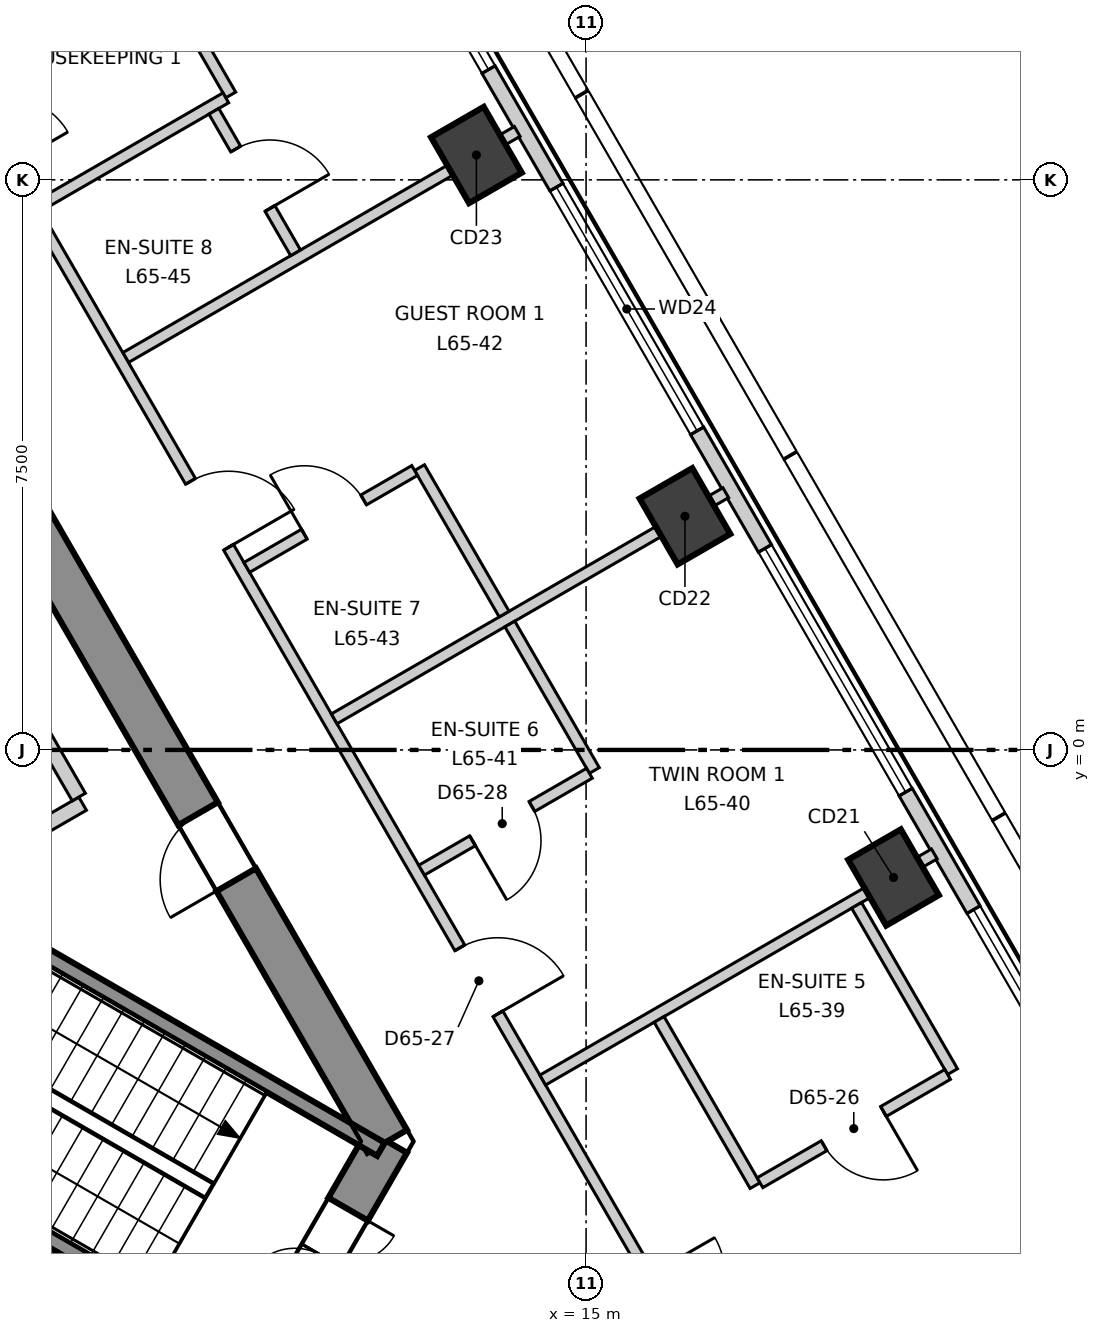
"""IFC4 building model, lengths in metres.
Left out: names, types, materials, properties, quantities, classifications, styles, units other than length and angle.
Written with IfcOpenShell. Run it as: python <this file> out.ifc"""

import sys

from ifc_helpers import new_model, si_unit, direction, frame, frame_2d, origin, origin_2d, place, context, subcontext, project, spatial, polyline, rectangle, outline, extrude, element, fill, save


model = new_model("IFC4")
c1 = context("Model", 3, precision=1e-05, world=origin(), true_north=direction((0.0, 1.0)))
c2 = subcontext(c1, "Body", "Model", "MODEL_VIEW")
j1 = project(units=[si_unit("LENGTHUNIT", "METRE"), si_unit("PLANEANGLEUNIT", "RADIAN")], contexts=[c1])
p1 = place(None, origin())
s1 = spatial("IfcSite", under=j1, at=p1, CompositionType="ELEMENT")
p2 = place(p1, origin())
s2 = spatial("IfcBuilding", under=s1, at=p2, CompositionType="ELEMENT")
p3 = place(p2, frame((0.0, 0.0, 279.1)))
s3 = spatial("IfcBuildingStorey", under=s2, at=p3, CompositionType="ELEMENT", Elevation=279.1)
p4 = place(p3, frame((10.652, -8.15, -0.3), z_axis=(0.0, 0.0, 1.0), x_axis=(0.49997462182, 0.866040055388, 0.0)))
e1 = element("IfcWall", 1, at=p4, inside=s3, PredefinedType="SHEAR", context=c2, shape_type="SweptSolid", body=[
    extrude(outline(polyline([(-0.173, -0.3), (1.732, -0.301), (3.638, -0.301), (3.291, 0.3), (1.732, 0.3), (0.173, 0.3), (-0.173, -0.3)])), origin(), (0.0, 0.0, 1.0), 3.6),
])
p5 = place(p4, frame((1.032, 0.0, 0.3)))
e2 = element("IfcOpeningElement", 2, at=p5, cuts=e1, PredefinedType="OPENING", context=c2, shape_type="SweptSolid", body=[
    extrude(rectangle(XDim=1.4, YDim=2.1, at=frame_2d((0.7, 1.05))), frame((0.0, 0.31, 0.0), z_axis=(0.0, -1.0, 0.0), x_axis=(1.0, 0.0, 0.0)), (0.0, 0.0, 1.0), 0.621),
])
p6 = place(p3, frame((12.384, -5.15, -0.3), z_axis=(0.0, 0.0, 1.0), x_axis=(-0.500000539815, 0.866025092122, 0.0)))
e3 = element("IfcWall", 3, at=p6, inside=s3, PredefinedType="SHEAR", context=c2, shape_type="SweptSolid", body=[
    extrude(outline(polyline([(-0.173, -0.301), (1.795, -0.301), (3.763, -0.301), (5.731, -0.301), (7.7, -0.301), (9.668, -0.301), (11.636, -0.301), (13.604, -0.3), (15.573, -0.3), (17.541, -0.3), (19.509, -0.3), (21.477, -0.3), (21.131, 0.3), (19.226, 0.3), (17.321, 0.3), (15.415, 0.3), (13.51, 0.3), (11.605, 0.3), (9.699, 0.3), (7.794, 0.3), (5.889, 0.3), (3.984, 0.3), (2.078, 0.3), (0.173, 0.3), (-0.173, -0.301)])), origin(), (0.0, 0.0, 1.0), 3.6),
])
p7 = place(p6, frame((16.378, 0.0, 0.3)))
e4 = element("IfcOpeningElement", 4, at=p7, cuts=e3, PredefinedType="OPENING", context=c2, shape_type="SweptSolid", body=[
    extrude(rectangle(XDim=0.9, YDim=2.1, at=frame_2d((0.45, 1.05))), frame((0.0, 0.31, 0.0), z_axis=(0.0, -1.0, 0.0), x_axis=(1.0, 0.0, 0.0)), (0.0, 0.0, 1.0), 0.621),
])
p8 = place(p6, frame((3.976, 0.0, 0.3)))
e5 = element("IfcOpeningElement", 5, at=p8, cuts=e3, PredefinedType="OPENING", context=c2, shape_type="SweptSolid", body=[
    extrude(rectangle(XDim=1.0, YDim=2.1, at=frame_2d((0.5, 1.05))), frame((0.0, 0.31, 0.0), z_axis=(0.0, -1.0, 0.0), x_axis=(1.0, 0.0, 0.0)), (0.0, 0.0, 1.0), 0.621),
])
for number, where, z_axis, x_axis in (
    (6, (19.045, -1.678, -0.3), (0.0, 0.0, 1.0), (-0.5, 0.866, 0.0)),
    (7, (16.301, 3.074, -0.3), (0.0, 0.0, 1.0), (-0.5, 0.866, 0.0)),
    (8, (13.557, 7.827, -0.3), (0.0, 0.0, 1.0), (-0.5, 0.866, 0.0)),
):
    element("IfcColumn", number, at=place(p3, frame(where, z_axis=z_axis, x_axis=x_axis)), inside=s3, PredefinedType="COLUMN", context=c2, shape_type="SweptSolid", body=[
        extrude(rectangle(XDim=1.0, YDim=0.8, at=origin_2d()), origin(), (0.0, 0.0, 1.0), 3.6),
    ])
p9 = place(p3, frame((25.791, -11.962, 0.0), z_axis=(0.0, 0.0, 1.0), x_axis=(-0.500006870765, 0.86602143691, 0.0)))
e9 = element("IfcWall", 9, at=p9, inside=s3, PredefinedType="ELEMENTEDWALL", context=c2, shape_type="SweptSolid", body=[
    extrude(rectangle(XDim=46.49, YDim=0.2, at=frame_2d((23.245, 0.0))), origin(), (0.0, 0.0, 1.0), 3.3),
])
p10 = place(p9, frame((2.197, 0.0, 0.9)))
e10 = element("IfcOpeningElement", 10, at=p10, cuts=e9, PredefinedType="OPENING", context=c2, shape_type="SweptSolid", body=[
    extrude(rectangle(XDim=3.7, YDim=2.2, at=frame_2d((1.85, 1.1))), frame((0.0, 0.11, 0.0), z_axis=(0.0, -1.0, 0.0), x_axis=(1.0, 0.0, 0.0)), (0.0, 0.0, 1.0), 0.22),
])
p11 = place(p9, frame((7.685, 0.0, 0.9)))
e11 = element("IfcOpeningElement", 11, at=p11, cuts=e9, PredefinedType="OPENING", context=c2, shape_type="SweptSolid", body=[
    extrude(rectangle(XDim=3.7, YDim=2.2, at=frame_2d((1.85, 1.1))), frame((0.0, 0.11, 0.0), z_axis=(0.0, -1.0, 0.0), x_axis=(1.0, 0.0, 0.0)), (0.0, 0.0, 1.0), 0.22),
])
p12 = place(p9, frame((13.173, 0.0, 0.9)))
e12 = element("IfcOpeningElement", 12, at=p12, cuts=e9, PredefinedType="OPENING", context=c2, shape_type="SweptSolid", body=[
    extrude(rectangle(XDim=3.7, YDim=2.2, at=frame_2d((1.85, 1.1))), frame((0.0, 0.11, 0.0), z_axis=(0.0, -1.0, 0.0), x_axis=(1.0, 0.0, 0.0)), (0.0, 0.0, 1.0), 0.22),
])
p13 = place(p9, frame((18.661, 0.0, 0.9)))
e13 = element("IfcOpeningElement", 13, at=p13, cuts=e9, PredefinedType="OPENING", context=c2, shape_type="SweptSolid", body=[
    extrude(rectangle(XDim=3.7, YDim=2.2, at=frame_2d((1.85, 1.1))), frame((0.0, 0.11, 0.0), z_axis=(0.0, -1.0, 0.0), x_axis=(1.0, 0.0, 0.0)), (0.0, 0.0, 1.0), 0.22),
])
p14 = place(p9, frame((24.149, 0.0, 0.9)))
e14 = element("IfcOpeningElement", 14, at=p14, cuts=e9, PredefinedType="OPENING", context=c2, shape_type="SweptSolid", body=[
    extrude(rectangle(XDim=3.7, YDim=2.2, at=frame_2d((1.85, 1.1))), frame((0.0, 0.11, 0.0), z_axis=(0.0, -1.0, 0.0), x_axis=(1.0, 0.0, 0.0)), (0.0, 0.0, 1.0), 0.22),
])
p15 = place(p9, frame((29.637, 0.0, 0.9)))
e15 = element("IfcOpeningElement", 15, at=p15, cuts=e9, PredefinedType="OPENING", context=c2, shape_type="SweptSolid", body=[
    extrude(rectangle(XDim=3.7, YDim=2.2, at=frame_2d((1.85, 1.1))), frame((0.0, 0.11, 0.0), z_axis=(0.0, -1.0, 0.0), x_axis=(1.0, 0.0, 0.0)), (0.0, 0.0, 1.0), 0.22),
])
p16 = place(p9, frame((35.125, 0.0, 0.9)))
e16 = element("IfcOpeningElement", 16, at=p16, cuts=e9, PredefinedType="OPENING", context=c2, shape_type="SweptSolid", body=[
    extrude(rectangle(XDim=3.7, YDim=2.2, at=frame_2d((1.85, 1.1))), frame((0.0, 0.11, 0.0), z_axis=(0.0, -1.0, 0.0), x_axis=(1.0, 0.0, 0.0)), (0.0, 0.0, 1.0), 0.22),
])
p17 = place(p9, frame((40.613, 0.0, 0.9)))
e17 = element("IfcOpeningElement", 17, at=p17, cuts=e9, PredefinedType="OPENING", context=c2, shape_type="SweptSolid", body=[
    extrude(rectangle(XDim=3.7, YDim=2.2, at=frame_2d((1.85, 1.1))), frame((0.0, 0.11, 0.0), z_axis=(0.0, -1.0, 0.0), x_axis=(1.0, 0.0, 0.0)), (0.0, 0.0, 1.0), 0.22),
])
p18 = place(p3, frame((8.942, 5.162, 0.0), z_axis=(0.0, 0.0, 1.0), x_axis=(0.866004483474, 0.50003623329, 0.0)))
e18 = element("IfcWall", 18, at=p18, inside=s3, PredefinedType="PARTITIONING", context=c2, shape_type="SweptSolid", body=[
    extrude(rectangle(XDim=5.949, YDim=0.15, at=frame_2d((2.975, 0.0))), origin(), (0.0, 0.0, 1.0), 2.8),
])
p19 = place(p3, frame((0.075, 20.37, 0.0), z_axis=(0.0, 0.0, 1.0), x_axis=(0.500003985697, -0.866023102629, 0.0)))
e19 = element("IfcWall", 19, at=p19, inside=s3, PredefinedType="PARTITIONING", context=c2, shape_type="SweptSolid", body=[
    extrude(rectangle(XDim=35.206, YDim=0.15, at=frame_2d((17.603, 0.0))), origin(), (0.0, 0.0, 1.0), 3.3),
])
p20 = place(p19, frame((31.506, 0.0, 0.0)))
e20 = element("IfcOpeningElement", 20, at=p20, cuts=e19, PredefinedType="OPENING", context=c2, shape_type="SweptSolid", body=[
    extrude(rectangle(XDim=1.0, YDim=2.1, at=frame_2d((0.5, 1.05))), frame((0.0, 0.085, 0.0), z_axis=(0.0, -1.0, 0.0), x_axis=(1.0, 0.0, 0.0)), (0.0, 0.0, 1.0), 0.17),
])
p21 = place(p19, frame((26.529, 0.0, 0.0)))
e21 = element("IfcOpeningElement", 21, at=p21, cuts=e19, PredefinedType="OPENING", context=c2, shape_type="SweptSolid", body=[
    extrude(rectangle(XDim=1.0, YDim=2.1, at=frame_2d((0.5, 1.05))), frame((0.0, 0.085, 0.0), z_axis=(0.0, -1.0, 0.0), x_axis=(1.0, 0.0, 0.0)), (0.0, 0.0, 1.0), 0.17),
])
p22 = place(p19, frame((19.442, 0.0, 0.0)))
e22 = element("IfcOpeningElement", 22, at=p22, cuts=e19, PredefinedType="OPENING", context=c2, shape_type="SweptSolid", body=[
    extrude(rectangle(XDim=1.0, YDim=2.1, at=frame_2d((0.5, 1.05))), frame((0.0, 0.085, 0.0), z_axis=(0.0, -1.0, 0.0), x_axis=(1.0, 0.0, 0.0)), (0.0, 0.0, 1.0), 0.17),
])
p23 = place(p19, frame((8.254, 0.0, 0.0)))
e23 = element("IfcOpeningElement", 23, at=p23, cuts=e19, PredefinedType="OPENING", context=c2, shape_type="SweptSolid", body=[
    extrude(rectangle(XDim=1.0, YDim=2.1, at=frame_2d((0.5, 1.05))), frame((0.0, 0.085, 0.0), z_axis=(0.0, -1.0, 0.0), x_axis=(1.0, 0.0, 0.0)), (0.0, 0.0, 1.0), 0.17),
])
p24 = place(p19, frame((13.754, 0.0, 0.0)))
e24 = element("IfcOpeningElement", 24, at=p24, cuts=e19, PredefinedType="OPENING", context=c2, shape_type="SweptSolid", body=[
    extrude(rectangle(XDim=0.9, YDim=2.1, at=frame_2d((0.45, 1.05))), frame((0.0, 0.085, 0.0), z_axis=(0.0, -1.0, 0.0), x_axis=(1.0, 0.0, 0.0)), (0.0, 0.0, 1.0), 0.17),
])
p25 = place(p19, frame((11.554, 0.0, 0.0)))
e25 = element("IfcOpeningElement", 25, at=p25, cuts=e19, PredefinedType="OPENING", context=c2, shape_type="SweptSolid", body=[
    extrude(rectangle(XDim=0.9, YDim=2.1, at=frame_2d((0.45, 1.05))), frame((0.0, 0.085, 0.0), z_axis=(0.0, -1.0, 0.0), x_axis=(1.0, 0.0, 0.0)), (0.0, 0.0, 1.0), 0.17),
])
p26 = place(p19, frame((2.777, 0.0, 0.0)))
e26 = element("IfcOpeningElement", 26, at=p26, cuts=e19, PredefinedType="OPENING", context=c2, shape_type="SweptSolid", body=[
    extrude(rectangle(XDim=1.0, YDim=2.1, at=frame_2d((0.5, 1.05))), frame((0.0, 0.085, 0.0), z_axis=(0.0, -1.0, 0.0), x_axis=(1.0, 0.0, 0.0)), (0.0, 0.0, 1.0), 0.17),
])
p27 = place(p3, frame((8.125, 12.427, 0.0), z_axis=(0.0, 0.0, 1.0), x_axis=(0.500036278648, -0.866004457284, 0.0)))
e27 = element("IfcWall", 27, at=p27, inside=s3, PredefinedType="PARTITIONING", context=c2, shape_type="SweptSolid", body=[
    extrude(rectangle(XDim=4.4, YDim=0.15, at=frame_2d((2.2, 0.0))), origin(), (0.0, 0.0, 1.0), 3.3),
])
for number, where, z_axis, x_axis in (
    (28, (6.692, 9.06, 0.0), (0.0, 0.0, 1.0), (0.866, 0.5, 0.0)),
    (29, (7.792, 7.154, 0.0), (0.0, 0.0, 1.0), (0.866, 0.5, 0.0)),
):
    element("IfcWall", number, at=place(p3, frame(where, z_axis=z_axis, x_axis=x_axis)), inside=s3, PredefinedType="PARTITIONING", context=c2, shape_type="SweptSolid", body=[
        extrude(rectangle(XDim=2.85, YDim=0.15, at=frame_2d((1.425, 0.0))), origin(), (0.0, 0.0, 1.0), 3.3),
    ])
p28 = place(p3, frame((11.686, 0.409, 0.0), z_axis=(0.0, 0.0, 1.0), x_axis=(0.865976450533, 0.500084779935, 0.0)))
e30 = element("IfcWall", 30, at=p28, inside=s3, PredefinedType="PARTITIONING", context=c2, shape_type="SweptSolid", body=[
    extrude(rectangle(XDim=5.949, YDim=0.15, at=frame_2d((2.975, 0.0))), origin(), (0.0, 0.0, 1.0), 3.3),
])
p29 = place(p3, frame((14.43, -4.343, 0.0), z_axis=(0.0, 0.0, 1.0), x_axis=(0.865986712877, 0.50006700863, 0.0)))
e31 = element("IfcWall", 31, at=p29, inside=s3, PredefinedType="PARTITIONING", context=c2, shape_type="SweptSolid", body=[
    extrude(rectangle(XDim=5.949, YDim=0.15, at=frame_2d((2.975, 0.0))), origin(), (0.0, 0.0, 1.0), 3.3),
])
p30 = place(p3, frame((15.961, -3.545, 0.0), z_axis=(0.0, 0.0, 1.0), x_axis=(0.499789415832, -0.866146950478, 0.0)))
e32 = element("IfcWall", 32, at=p30, inside=s3, PredefinedType="PARTITIONING", context=c2, shape_type="SweptSolid", body=[
    extrude(rectangle(XDim=2.525, YDim=0.15, at=frame_2d((1.262, 0.0))), origin(), (0.0, 0.0, 1.0), 3.3),
])
p31 = place(p3, frame((18.559, -2.045, 0.0), z_axis=(0.0, 0.0, 1.0), x_axis=(0.500079482444, -0.865979509711, 0.0)))
e33 = element("IfcWall", 33, at=p31, inside=s3, PredefinedType="PARTITIONING", context=c2, shape_type="SweptSolid", body=[
    extrude(rectangle(XDim=2.525, YDim=0.15, at=frame_2d((1.263, 0.0))), origin(), (0.0, 0.0, 1.0), 3.3),
])
p32 = place(p3, frame((10.103, 8.402, 0.0), z_axis=(0.0, 0.0, 1.0), x_axis=(0.499961633463, -0.866047553582, 0.0)))
e34 = element("IfcWall", 34, at=p32, inside=s3, PredefinedType="PARTITIONING", context=c2, shape_type="SweptSolid", body=[
    extrude(rectangle(XDim=2.15, YDim=0.15, at=frame_2d((1.075, 0.0))), origin(), (0.0, 0.0, 1.0), 3.3),
])
p33 = place(p32, frame((0.575, 0.0, 0.0)))
e35 = element("IfcOpeningElement", 35, at=p33, cuts=e34, PredefinedType="OPENING", context=c2, shape_type="SweptSolid", body=[
    extrude(rectangle(XDim=0.9, YDim=2.1, at=frame_2d((0.45, 1.05))), frame((0.0, 0.085, 0.0), z_axis=(0.0, -1.0, 0.0), x_axis=(1.0, 0.0, 0.0)), (0.0, 0.0, 1.0), 0.17),
])
p34 = place(p3, frame((12.809, 3.714, 0.0), z_axis=(0.0, 0.0, 1.0), x_axis=(0.500162441854, -0.865931597621, 0.0)))
e36 = element("IfcWall", 36, at=p34, inside=s3, PredefinedType="PARTITIONING", context=c2, shape_type="SweptSolid", body=[
    extrude(rectangle(XDim=2.225, YDim=0.15, at=frame_2d((1.113, 0.0))), origin(), (0.0, 0.0, 1.0), 3.3),
])
p35 = place(p3, frame((13.997, 1.657, 0.0), z_axis=(0.0, 0.0, 1.0), x_axis=(0.499750953666, -0.866169143014, 0.0)))
e37 = element("IfcWall", 37, at=p35, inside=s3, PredefinedType="PARTITIONING", context=c2, shape_type="SweptSolid", body=[
    extrude(rectangle(XDim=2.225, YDim=0.15, at=frame_2d((1.112, 0.0))), origin(), (0.0, 0.0, 1.0), 3.3),
])
p36 = place(p3, frame((12.836, -1.582, 0.0), z_axis=(0.0, 0.0, 1.0), x_axis=(0.865965520905, 0.500103705848, 0.0)))
e38 = element("IfcWall", 38, at=p36, inside=s3, PredefinedType="PARTITIONING", context=c2, shape_type="SweptSolid", body=[
    extrude(rectangle(XDim=2.55, YDim=0.15, at=frame_2d((1.275, 0.0))), origin(), (0.0, 0.0, 1.0), 3.3),
])
p37 = place(p36, frame((0.775, 0.0, 0.0)))
e39 = element("IfcOpeningElement", 39, at=p37, cuts=e38, PredefinedType="OPENING", context=c2, shape_type="SweptSolid", body=[
    extrude(rectangle(XDim=0.9, YDim=2.1, at=frame_2d((0.45, 1.05))), frame((0.0, 0.085, 0.0), z_axis=(0.0, -1.0, 0.0), x_axis=(1.0, 0.0, 0.0)), (0.0, 0.0, 1.0), 0.17),
])
p38 = place(p3, frame((10.536, 2.401, 0.0), z_axis=(0.0, 0.0, 1.0), x_axis=(0.865965520905, 0.500103705848, 0.0)))
e40 = element("IfcWall", 40, at=p38, inside=s3, PredefinedType="PARTITIONING", context=c2, shape_type="SweptSolid", body=[
    extrude(rectangle(XDim=2.55, YDim=0.15, at=frame_2d((1.275, 0.0))), origin(), (0.0, 0.0, 1.0), 3.3),
])
p39 = place(p38, frame((0.875, 0.0, 0.0)))
e41 = element("IfcOpeningElement", 41, at=p39, cuts=e40, PredefinedType="OPENING", context=c2, shape_type="SweptSolid", body=[
    extrude(rectangle(XDim=0.9, YDim=2.1, at=frame_2d((0.45, 1.05))), frame((0.0, 0.085, 0.0), z_axis=(0.0, -1.0, 0.0), x_axis=(1.0, 0.0, 0.0)), (0.0, 0.0, 1.0), 0.17),
])
p40 = place(p3, frame((17.288, -5.694, 0.0), z_axis=(0.0, 0.0, 1.0), x_axis=(0.866090043625, 0.499888023795, 0.0)))
e42 = element("IfcWall", 42, at=p40, inside=s3, PredefinedType="PARTITIONING", context=c2, shape_type="SweptSolid", body=[
    extrude(rectangle(XDim=2.851, YDim=0.15, at=frame_2d((1.425, 0.0))), origin(), (0.0, 0.0, 1.0), 3.3),
])
p41 = place(p40, frame((0.975, 0.0, 0.0)))
e43 = element("IfcOpeningElement", 43, at=p41, cuts=e42, PredefinedType="OPENING", context=c2, shape_type="SweptSolid", body=[
    extrude(rectangle(XDim=0.9, YDim=2.1, at=frame_2d((0.45, 1.05))), frame((0.0, 0.085, 0.0), z_axis=(0.0, -1.0, 0.0), x_axis=(1.0, 0.0, 0.0)), (0.0, 0.0, 1.0), 0.17),
])
p42 = place(p3, frame((6.642, -1.708, 0.0), z_axis=(0.0, 0.0, 1.0), x_axis=(0.866043441391, 0.499968756647, 0.0)))
e44 = element("IfcWall", 44, at=p42, inside=s3, PredefinedType="SOLIDWALL", context=c2, shape_type="SweptSolid", body=[
    extrude(rectangle(XDim=2.002, YDim=0.2, at=frame_2d((1.001, 0.0))), origin(), (0.0, 0.0, 1.0), 3.3),
])
p43 = place(p3, frame((6.826, 1.978, 0.0), z_axis=(0.0, 0.0, 1.0), x_axis=(0.499990139034, -0.866031096941, 0.0)))
e45 = element("IfcWall", 45, at=p43, inside=s3, PredefinedType="SOLIDWALL", context=c2, shape_type="SweptSolid", body=[
    extrude(rectangle(XDim=3.0, YDim=0.2, at=frame_2d((1.5, 0.0))), origin(), (0.0, 0.0, 1.0), 3.3),
])
p44 = place(p3, frame((6.529, -1.922, 0.0), z_axis=(0.0, 0.0, 1.0), x_axis=(0.866068467981, -0.499925403204, 0.0)))
e46 = element("IfcWall", 46, at=p44, inside=s3, PredefinedType="SOLIDWALL", context=c2, shape_type="SweptSolid", body=[
    extrude(rectangle(XDim=6.665, YDim=0.2, at=frame_2d((3.332, 0.0))), origin(), (0.0, 0.0, 1.0), 3.3),
])
p45 = place(p3, frame((4.929, -4.693, 0.0), z_axis=(0.0, 0.0, 1.0), x_axis=(0.866005022404, -0.500035299925, 0.0)))
e47 = element("IfcWall", 47, at=p45, inside=s3, PredefinedType="SOLIDWALL", context=c2, shape_type="SweptSolid", body=[
    extrude(rectangle(XDim=6.665, YDim=0.2, at=frame_2d((3.333, 0.0))), origin(), (0.0, 0.0, 1.0), 3.3),
])
p46 = place(p11, origin())
e48 = element("IfcWindow", 48, at=p46, inside=s3, PartitioningType="SINGLE_PANEL", PredefinedType="WINDOW", context=c2, shape_type="SweptSolid", body=[
    extrude(rectangle(XDim=3.7, YDim=2.2, at=frame_2d((1.85, 1.1))), frame((0.0, 0.03, 0.0), z_axis=(0.0, -1.0, 0.0), x_axis=(1.0, 0.0, 0.0)), (0.0, 0.0, 1.0), 0.06),
])
fill(e11, e48)
p47 = place(p12, origin())
e49 = element("IfcWindow", 49, at=p47, inside=s3, PartitioningType="SINGLE_PANEL", PredefinedType="WINDOW", context=c2, shape_type="SweptSolid", body=[
    extrude(rectangle(XDim=3.7, YDim=2.2, at=frame_2d((1.85, 1.1))), frame((0.0, 0.03, 0.0), z_axis=(0.0, -1.0, 0.0), x_axis=(1.0, 0.0, 0.0)), (0.0, 0.0, 1.0), 0.06),
])
fill(e12, e49)
p48 = place(p13, origin())
e50 = element("IfcWindow", 50, at=p48, inside=s3, PartitioningType="SINGLE_PANEL", PredefinedType="WINDOW", context=c2, shape_type="SweptSolid", body=[
    extrude(rectangle(XDim=3.7, YDim=2.2, at=frame_2d((1.85, 1.1))), frame((0.0, 0.03, 0.0), z_axis=(0.0, -1.0, 0.0), x_axis=(1.0, 0.0, 0.0)), (0.0, 0.0, 1.0), 0.06),
])
fill(e13, e50)
p49 = place(p14, origin())
e51 = element("IfcWindow", 51, at=p49, inside=s3, PartitioningType="SINGLE_PANEL", PredefinedType="WINDOW", context=c2, shape_type="SweptSolid", body=[
    extrude(rectangle(XDim=3.7, YDim=2.2, at=frame_2d((1.85, 1.1))), frame((0.0, 0.03, 0.0), z_axis=(0.0, -1.0, 0.0), x_axis=(1.0, 0.0, 0.0)), (0.0, 0.0, 1.0), 0.06),
])
fill(e14, e51)
p50 = place(p41, origin())
e52 = element("IfcDoor", 52, at=p50, inside=s3, OperationType="SINGLE_SWING_RIGHT", PredefinedType="DOOR", context=c2, shape_type="SweptSolid", body=[
    extrude(rectangle(XDim=0.9, YDim=2.1, at=frame_2d((0.45, 1.05))), frame((0.0, 0.025, 0.0), z_axis=(0.0, -1.0, 0.0), x_axis=(1.0, 0.0, 0.0)), (0.0, 0.0, 1.0), 0.05),
])
fill(e43, e52)
p51 = place(p21, origin())
e53 = element("IfcDoor", 53, at=p51, inside=s3, OperationType="SINGLE_SWING_LEFT", PredefinedType="DOOR", context=c2, shape_type="SweptSolid", body=[
    extrude(rectangle(XDim=1.0, YDim=2.1, at=frame_2d((0.5, 1.05))), frame((0.0, 0.025, 0.0), z_axis=(0.0, -1.0, 0.0), x_axis=(1.0, 0.0, 0.0)), (0.0, 0.0, 1.0), 0.05),
])
fill(e21, e53)
p52 = place(p37, origin())
e54 = element("IfcDoor", 54, at=p52, inside=s3, OperationType="SINGLE_SWING_LEFT", PredefinedType="DOOR", context=c2, shape_type="SweptSolid", body=[
    extrude(rectangle(XDim=0.9, YDim=2.1, at=frame_2d((0.45, 1.05))), frame((0.0, 0.025, 0.0), z_axis=(0.0, -1.0, 0.0), x_axis=(1.0, 0.0, 0.0)), (0.0, 0.0, 1.0), 0.05),
])
fill(e39, e54)
p53 = place(p22, origin())
e55 = element("IfcDoor", 55, at=p53, inside=s3, OperationType="SINGLE_SWING_LEFT", PredefinedType="DOOR", context=c2, shape_type="SweptSolid", body=[
    extrude(rectangle(XDim=1.0, YDim=2.1, at=frame_2d((0.5, 1.05))), frame((0.0, 0.025, 0.0), z_axis=(0.0, -1.0, 0.0), x_axis=(1.0, 0.0, 0.0)), (0.0, 0.0, 1.0), 0.05),
])
fill(e22, e55)
p54 = place(p39, origin())
e56 = element("IfcDoor", 56, at=p54, inside=s3, OperationType="SINGLE_SWING_RIGHT", PredefinedType="DOOR", context=c2, shape_type="SweptSolid", body=[
    extrude(rectangle(XDim=0.9, YDim=2.1, at=frame_2d((0.45, 1.05))), frame((0.0, 0.025, 0.0), z_axis=(0.0, -1.0, 0.0), x_axis=(1.0, 0.0, 0.0)), (0.0, 0.0, 1.0), 0.05),
])
fill(e41, e56)
p55 = place(p33, origin())
e57 = element("IfcDoor", 57, at=p55, inside=s3, OperationType="SINGLE_SWING_LEFT", PredefinedType="DOOR", context=c2, shape_type="SweptSolid", body=[
    extrude(rectangle(XDim=0.9, YDim=2.1, at=frame_2d((0.45, 1.05))), frame((0.0, 0.025, 0.0), z_axis=(0.0, -1.0, 0.0), x_axis=(1.0, 0.0, 0.0)), (0.0, 0.0, 1.0), 0.05),
])
fill(e35, e57)
p56 = place(p5, origin())
e58 = element("IfcDoor", 58, at=p56, inside=s3, OperationType="DOUBLE_DOOR_SINGLE_SWING", PredefinedType="DOOR", context=c2, shape_type="SweptSolid", body=[
    extrude(rectangle(XDim=1.4, YDim=2.1, at=frame_2d((0.7, 1.05))), frame((0.0, 0.025, 0.0), z_axis=(0.0, -1.0, 0.0), x_axis=(1.0, 0.0, 0.0)), (0.0, 0.0, 1.0), 0.05),
])
fill(e2, e58)
p57 = place(p8, origin())
e59 = element("IfcDoor", 59, at=p57, inside=s3, OperationType="SINGLE_SWING_RIGHT", PredefinedType="DOOR", context=c2, shape_type="SweptSolid", body=[
    extrude(rectangle(XDim=1.0, YDim=2.1, at=frame_2d((0.5, 1.05))), frame((0.0, 0.025, 0.0), z_axis=(0.0, -1.0, 0.0), x_axis=(1.0, 0.0, 0.0)), (0.0, 0.0, 1.0), 0.05),
])
fill(e5, e59)
save(model, sys.argv[1])
